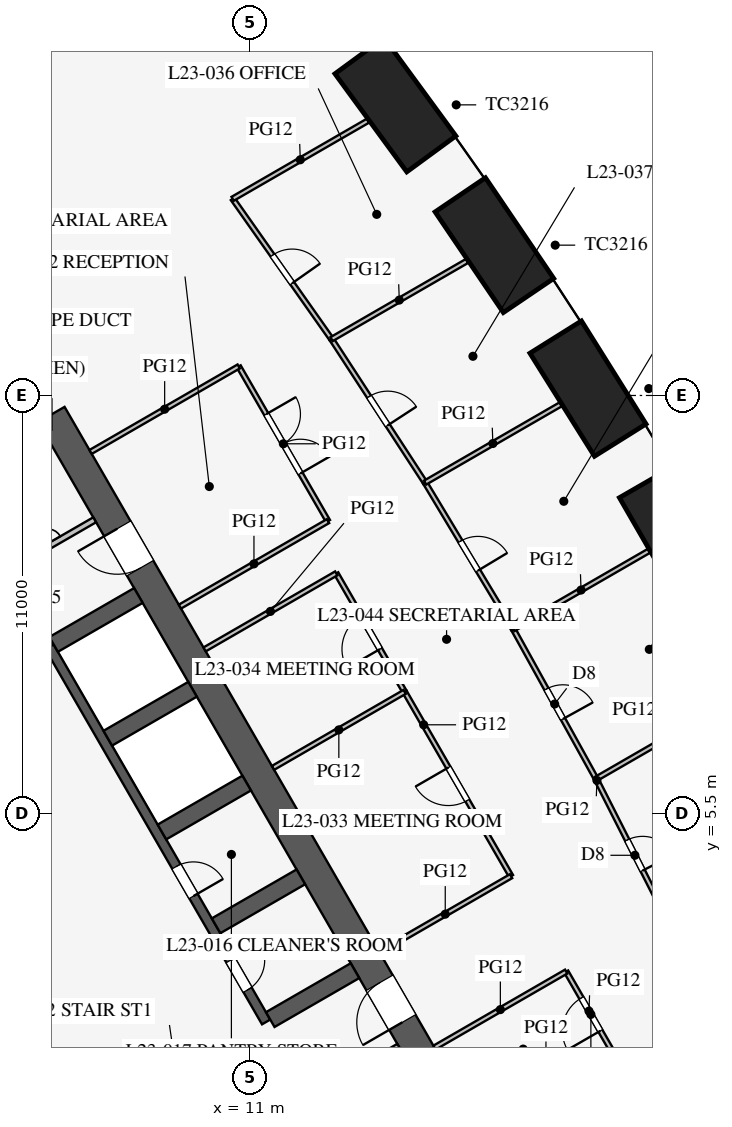
"""IFC4 building model, lengths in metres.
Left out: names, types, materials, properties, quantities, classifications, styles, units other than length and angle.
Written with IfcOpenShell. Run it as: python <this file> out.ifc"""

import sys

from ifc_helpers import new_model, si_unit, direction, frame, frame_2d, origin, origin_2d, place, context, subcontext, project, spatial, rectangle, extrude, element, fill, save


model = new_model("IFC4")
c1 = context("Model", 3, precision=1e-05, world=origin(), true_north=direction((0.0, 1.0)))
c2 = subcontext(c1, "Body", "Model", "MODEL_VIEW")
j1 = project(units=[si_unit("LENGTHUNIT", "METRE"), si_unit("PLANEANGLEUNIT", "RADIAN")], contexts=[c1])
p1 = place(None, origin())
s1 = spatial("IfcSite", under=j1, at=p1, CompositionType="ELEMENT")
p2 = place(p1, origin())
s2 = spatial("IfcBuilding", under=s1, at=p2, CompositionType="ELEMENT")
p3 = place(p2, frame((0.0, 0.0, 103.1)))
s3 = spatial("IfcBuildingStorey", under=s2, at=p3, CompositionType="ELEMENT", Elevation=103.1)
for number, where, z_axis, x_axis in (
    (1, (22.213, 12.825, 0.0), (0.0, 0.0, 1.0), (-0.5, 0.866, 0.0)),
    (2, (19.893, 16.681, 0.0), (0.0, 0.0, 1.0), (-0.531, 0.847, 0.0)),
    (3, (17.43, 20.456, 0.0), (0.0, 0.0, 1.0), (-0.561, 0.828, 0.0)),
    (4, (14.825, 24.148, 0.0), (0.0, 0.0, 1.0), (-0.591, 0.807, 0.0)),
):
    element("IfcColumn", number, at=place(p3, frame(where, z_axis=z_axis, x_axis=x_axis)), inside=s3, PredefinedType="COLUMN", context=c2, shape_type="SweptSolid", body=[
        extrude(rectangle(XDim=3.2, YDim=1.6, at=origin_2d()), origin(), (0.0, 0.0, 1.0), 4.2),
    ])
p4 = place(p3, frame((16.743, -3.0, 0.0), z_axis=(0.0, 0.0, 1.0), x_axis=(-0.500002442456, 0.866023993627, 0.0)))
e5 = element("IfcWall", 5, at=p4, inside=s3, PredefinedType="SHEAR", context=c2, shape_type="SweptSolid", body=[
    extrude(rectangle(XDim=21.939, YDim=0.8, at=frame_2d((10.97, 0.0))), origin(), (0.0, 0.0, 1.0), 4.2),
])
p5 = place(p4, frame((17.27, 0.0, 0.0)))
e6 = element("IfcOpeningElement", 6, at=p5, cuts=e5, PredefinedType="OPENING", context=c2, shape_type="SweptSolid", body=[
    extrude(rectangle(XDim=1.2, YDim=2.1, at=frame_2d((0.6, 1.05))), frame((0.0, 0.41, 0.0), z_axis=(0.0, -1.0, 0.0), x_axis=(1.0, 0.0, 0.0)), (0.0, 0.0, 1.0), 0.82),
])
p6 = place(p4, frame((3.47, 0.0, 0.0)))
e7 = element("IfcOpeningElement", 7, at=p6, cuts=e5, PredefinedType="OPENING", context=c2, shape_type="SweptSolid", body=[
    extrude(rectangle(XDim=1.2, YDim=2.1, at=frame_2d((0.6, 1.05))), frame((0.0, 0.41, 0.0), z_axis=(0.0, -1.0, 0.0), x_axis=(1.0, 0.0, 0.0)), (0.0, 0.0, 1.0), 0.82),
])
p7 = place(p3, frame((11.424, 0.014, 0.0), z_axis=(0.0, 0.0, 1.0), x_axis=(-0.500001763848, 0.866024385424, 0.0)))
e8 = element("IfcWall", 8, at=p7, inside=s3, PredefinedType="SHEAR", context=c2, shape_type="SweptSolid", body=[
    extrude(rectangle(XDim=11.4, YDim=0.25, at=frame_2d((5.7, 0.0))), origin(), (0.0, 0.0, 1.0), 4.2),
])
p8 = place(p7, frame((0.975, 0.0, 0.0)))
e9 = element("IfcOpeningElement", 9, at=p8, cuts=e8, PredefinedType="OPENING", context=c2, shape_type="SweptSolid", body=[
    extrude(rectangle(XDim=0.9, YDim=2.1, at=frame_2d((0.45, 1.05))), frame((0.0, 0.135, 0.0), z_axis=(0.0, -1.0, 0.0), x_axis=(1.0, 0.0, 0.0)), (0.0, 0.0, 1.0), 0.27),
])
p9 = place(p7, frame((3.825, 0.0, 0.0)))
e10 = element("IfcOpeningElement", 10, at=p9, cuts=e8, PredefinedType="OPENING", context=c2, shape_type="SweptSolid", body=[
    extrude(rectangle(XDim=0.9, YDim=2.1, at=frame_2d((0.45, 1.05))), frame((0.0, 0.135, 0.0), z_axis=(0.0, -1.0, 0.0), x_axis=(1.0, 0.0, 0.0)), (0.0, 0.0, 1.0), 0.27),
])
for number, where, z_axis, x_axis in (
    (11, (11.532, 0.076, 0.0), (0.0, 0.0, 1.0), (0.866, 0.5, 0.0)),
    (12, (10.107, 2.544, 0.0), (0.0, 0.0, 1.0), (0.866, 0.5, 0.0)),
    (13, (8.682, 5.012, 0.0), (0.0, 0.0, 1.0), (0.866, 0.5, 0.0)),
    (14, (7.257, 7.481, 0.0), (0.0, 0.0, 1.0), (0.866, 0.5, 0.0)),
):
    element("IfcWall", number, at=place(p3, frame(where, z_axis=z_axis, x_axis=x_axis)), inside=s3, PredefinedType="SHEAR", context=c2, shape_type="SweptSolid", body=[
        extrude(rectangle(XDim=2.575, YDim=0.45, at=frame_2d((1.288, 0.0))), origin(), (0.0, 0.0, 1.0), 4.2),
    ])
p10 = place(p3, frame((5.832, 9.949, 0.0), z_axis=(0.0, 0.0, 1.0), x_axis=(0.866029291668, 0.499993265928, 0.0)))
e15 = element("IfcWall", 15, at=p10, inside=s3, PredefinedType="SHEAR", context=c2, shape_type="SweptSolid", body=[
    extrude(rectangle(XDim=2.575, YDim=0.45, at=frame_2d((1.288, 0.0))), origin(), (0.0, 0.0, 1.0), 4.2),
])
p11 = place(p3, frame((2.495, 10.678, 0.0), z_axis=(0.0, 0.0, 1.0), x_axis=(0.86602216432, 0.500005610874, 0.0)))
e16 = element("IfcWall", 16, at=p11, inside=s3, PredefinedType="PARTITIONING", context=c2, shape_type="SweptSolid", body=[
    extrude(rectangle(XDim=5.1, YDim=0.15, at=frame_2d((2.55, 0.0))), origin(), (0.0, 0.0, 1.0), 4.0),
])
p12 = place(p11, frame((1.3, 0.0, 0.0)))
e17 = element("IfcOpeningElement", 17, at=p12, cuts=e16, PredefinedType="OPENING", context=c2, shape_type="SweptSolid", body=[
    extrude(rectangle(XDim=0.9, YDim=2.1, at=frame_2d((0.45, 1.05))), frame((0.0, 0.085, 0.0), z_axis=(0.0, -1.0, 0.0), x_axis=(1.0, 0.0, 0.0)), (0.0, 0.0, 1.0), 0.17),
])
p13 = place(p3, frame((10.495, -3.178, 0.0), z_axis=(0.0, 0.0, 1.0), x_axis=(0.86602216432, 0.500005610874, 0.0)))
e18 = element("IfcWall", 18, at=p13, inside=s3, PredefinedType="PARTITIONING", context=c2, shape_type="SweptSolid", body=[
    extrude(rectangle(XDim=5.1, YDim=0.15, at=frame_2d((2.55, 0.0))), origin(), (0.0, 0.0, 1.0), 4.0),
])
p14 = place(p13, frame((2.6, 0.0, 0.0)))
e19 = element("IfcOpeningElement", 19, at=p14, cuts=e18, PredefinedType="OPENING", context=c2, shape_type="SweptSolid", body=[
    extrude(rectangle(XDim=0.9, YDim=2.1, at=frame_2d((0.45, 1.05))), frame((0.0, 0.085, 0.0), z_axis=(0.0, -1.0, 0.0), x_axis=(1.0, 0.0, 0.0)), (0.0, 0.0, 1.0), 0.17),
])
p15 = place(p3, frame((13.052, 13.194, 0.0), z_axis=(0.0, 0.0, 1.0), x_axis=(-0.499977259774, 0.866038532462, 0.0)))
e20 = element("IfcWall", 20, at=p15, inside=s3, PredefinedType="PARTITIONING", context=c2, shape_type="SweptSolid", body=[
    extrude(rectangle(XDim=4.7, YDim=0.12, at=frame_2d((2.35, 0.0))), origin(), (0.0, 0.0, 1.0), 2.9),
])
p16 = place(p15, frame((1.45, 0.0, 0.15)))
e21 = element("IfcOpeningElement", 21, at=p16, cuts=e20, PredefinedType="OPENING", context=c2, shape_type="SweptSolid", body=[
    extrude(rectangle(XDim=1.8, YDim=2.1, at=frame_2d((0.9, 1.05))), frame((0.0, 0.07, 0.0), z_axis=(0.0, -1.0, 0.0), x_axis=(1.0, 0.0, 0.0)), (0.0, 0.0, 1.0), 0.14),
])
p17 = place(p3, frame((15.069, 8.7, 0.0), z_axis=(0.0, 0.0, 1.0), x_axis=(-0.500012057535, 0.866018442252, 0.0)))
e22 = element("IfcWall", 22, at=p17, inside=s3, PredefinedType="PARTITIONING", context=c2, shape_type="SweptSolid", body=[
    extrude(rectangle(XDim=3.6, YDim=0.12, at=frame_2d((1.8, 0.0))), origin(), (0.0, 0.0, 1.0), 2.9),
])
p18 = place(p17, frame((1.3, 0.0, 0.15)))
e23 = element("IfcOpeningElement", 23, at=p18, cuts=e22, PredefinedType="OPENING", context=c2, shape_type="SweptSolid", body=[
    extrude(rectangle(XDim=1.0, YDim=2.1, at=frame_2d((0.5, 1.05))), frame((0.0, 0.07, 0.0), z_axis=(0.0, -1.0, 0.0), x_axis=(1.0, 0.0, 0.0)), (0.0, 0.0, 1.0), 0.14),
])
p19 = place(p3, frame((20.519, -0.74, 0.0), z_axis=(0.0, 0.0, 1.0), x_axis=(-0.499957262057, 0.866050077142, 0.0)))
e24 = element("IfcWall", 24, at=p19, inside=s3, PredefinedType="PARTITIONING", context=c2, shape_type="SweptSolid", body=[
    extrude(rectangle(XDim=2.4, YDim=0.12, at=frame_2d((1.2, 0.0))), origin(), (0.0, 0.0, 1.0), 2.9),
])
p20 = place(p19, frame((0.6, 0.0, 0.15)))
e25 = element("IfcOpeningElement", 25, at=p20, cuts=e24, PredefinedType="OPENING", context=c2, shape_type="SweptSolid", body=[
    extrude(rectangle(XDim=1.0, YDim=2.1, at=frame_2d((0.5, 1.05))), frame((0.0, 0.07, 0.0), z_axis=(0.0, -1.0, 0.0), x_axis=(1.0, 0.0, 0.0)), (0.0, 0.0, 1.0), 0.14),
])
p21 = place(p3, frame((17.869, 3.85, 0.0), z_axis=(0.0, 0.0, 1.0), x_axis=(-0.500016814911, 0.866015695474, 0.0)))
e26 = element("IfcWall", 26, at=p21, inside=s3, PredefinedType="PARTITIONING", context=c2, shape_type="SweptSolid", body=[
    extrude(rectangle(XDim=5.6, YDim=0.12, at=frame_2d((2.8, 0.0))), origin(), (0.0, 0.0, 1.0), 2.9),
])
p22 = place(p21, frame((2.3, 0.0, 0.15)))
e27 = element("IfcOpeningElement", 27, at=p22, cuts=e26, PredefinedType="OPENING", context=c2, shape_type="SweptSolid", body=[
    extrude(rectangle(XDim=1.0, YDim=2.1, at=frame_2d((0.5, 1.05))), frame((0.0, 0.07, 0.0), z_axis=(0.0, -1.0, 0.0), x_axis=(1.0, 0.0, 0.0)), (0.0, 0.0, 1.0), 0.14),
])
p23 = place(p3, frame((9.805, 9.818, 0.0), z_axis=(0.0, 0.0, 1.0), x_axis=(0.866026010844, 0.49999894854, 0.0)))
e28 = element("IfcWall", 28, at=p23, inside=s3, PredefinedType="PARTITIONING", context=c2, shape_type="SweptSolid", body=[
    extrude(rectangle(XDim=4.0, YDim=0.12, at=frame_2d((2.0, 0.0))), origin(), (0.0, 0.0, 1.0), 2.9),
])
p24 = place(p3, frame((9.155, 10.944, 0.0), z_axis=(0.0, 0.0, 1.0), x_axis=(0.866017533419, 0.500013631625, 0.0)))
e29 = element("IfcWall", 29, at=p24, inside=s3, PredefinedType="PARTITIONING", context=c2, shape_type="SweptSolid", body=[
    extrude(rectangle(XDim=4.5, YDim=0.12, at=frame_2d((2.25, 0.0))), origin(), (0.0, 0.0, 1.0), 2.9),
])
p25 = place(p3, frame((6.805, 15.014, 0.0), z_axis=(0.0, 0.0, 1.0), x_axis=(0.866031096941, 0.499990139034, 0.0)))
e30 = element("IfcWall", 30, at=p25, inside=s3, PredefinedType="PARTITIONING", context=c2, shape_type="SweptSolid", body=[
    extrude(rectangle(XDim=4.5, YDim=0.12, at=frame_2d((2.25, 0.0))), origin(), (0.0, 0.0, 1.0), 2.9),
])
p26 = place(p3, frame((11.605, 6.7, 0.0), z_axis=(0.0, 0.0, 1.0), x_axis=(0.866026010844, 0.49999894854, 0.0)))
e31 = element("IfcWall", 31, at=p26, inside=s3, PredefinedType="PARTITIONING", context=c2, shape_type="SweptSolid", body=[
    extrude(rectangle(XDim=4.0, YDim=0.12, at=frame_2d((2.0, 0.0))), origin(), (0.0, 0.0, 1.0), 2.4),
])
for number, where, z_axis, x_axis in (
    (32, (14.405, 1.85, 0.0), (0.0, 0.0, 1.0), (0.866, 0.5, 0.0)),
    (33, (15.855, -0.661, 0.0), (0.0, 0.0, 1.0), (0.866, 0.5, 0.0)),
):
    element("IfcWall", number, at=place(p3, frame(where, z_axis=z_axis, x_axis=x_axis)), inside=s3, PredefinedType="PARTITIONING", context=c2, shape_type="SweptSolid", body=[
        extrude(rectangle(XDim=4.0, YDim=0.12, at=frame_2d((2.0, 0.0))), origin(), (0.0, 0.0, 1.0), 2.9),
    ])
p27 = place(p3, frame((17.927, 10.35, 0.0), z_axis=(0.0, 0.0, 1.0), x_axis=(-0.515548366618, 0.856860479703, 0.0)))
e34 = element("IfcWall", 34, at=p27, inside=s3, PredefinedType="PARTITIONING", context=c2, shape_type="SweptSolid", body=[
    extrude(rectangle(XDim=4.501, YDim=0.12, at=frame_2d((2.25, 0.0))), origin(), (0.0, 0.0, 1.0), 2.9),
])
p28 = place(p27, frame((1.8, 0.0, 0.15)))
e35 = element("IfcOpeningElement", 35, at=p28, cuts=e34, PredefinedType="OPENING", context=c2, shape_type="SweptSolid", body=[
    extrude(rectangle(XDim=0.9, YDim=2.1, at=frame_2d((0.45, 1.05))), frame((0.0, 0.07, 0.0), z_axis=(0.0, -1.0, 0.0), x_axis=(1.0, 0.0, 0.0)), (0.0, 0.0, 1.0), 0.14),
])
p29 = place(p3, frame((15.606, 14.206, 0.0), z_axis=(0.0, 0.0, 1.0), x_axis=(-0.546069464151, 0.837739900161, 0.0)))
e36 = element("IfcWall", 36, at=p29, inside=s3, PredefinedType="PARTITIONING", context=c2, shape_type="SweptSolid", body=[
    extrude(rectangle(XDim=4.507, YDim=0.12, at=frame_2d((2.253, 0.0))), origin(), (0.0, 0.0, 1.0), 2.9),
])
p30 = place(p29, frame((1.8, 0.0, 0.15)))
e37 = element("IfcOpeningElement", 37, at=p30, cuts=e36, PredefinedType="OPENING", context=c2, shape_type="SweptSolid", body=[
    extrude(rectangle(XDim=0.9, YDim=2.1, at=frame_2d((0.45, 1.05))), frame((0.0, 0.07, 0.0), z_axis=(0.0, -1.0, 0.0), x_axis=(1.0, 0.0, 0.0)), (0.0, 0.0, 1.0), 0.14),
])
p31 = place(p3, frame((13.145, 17.982, 0.0), z_axis=(0.0, 0.0, 1.0), x_axis=(-0.575987178736, 0.817458726745, 0.0)))
e38 = element("IfcWall", 38, at=p31, inside=s3, PredefinedType="PARTITIONING", context=c2, shape_type="SweptSolid", body=[
    extrude(rectangle(XDim=4.518, YDim=0.12, at=frame_2d((2.259, 0.0))), origin(), (0.0, 0.0, 1.0), 2.9),
])
p32 = place(p31, frame((1.8, 0.0, 0.15)))
e39 = element("IfcOpeningElement", 39, at=p32, cuts=e38, PredefinedType="OPENING", context=c2, shape_type="SweptSolid", body=[
    extrude(rectangle(XDim=0.9, YDim=2.1, at=frame_2d((0.45, 1.05))), frame((0.0, 0.07, 0.0), z_axis=(0.0, -1.0, 0.0), x_axis=(1.0, 0.0, 0.0)), (0.0, 0.0, 1.0), 0.14),
])
p33 = place(p3, frame((20.106, 6.412, 0.0), z_axis=(0.0, 0.0, 1.0), x_axis=(-0.484292898211, 0.874905931368, 0.0)))
e40 = element("IfcWall", 40, at=p33, inside=s3, PredefinedType="PARTITIONING", context=c2, shape_type="SweptSolid", body=[
    extrude(rectangle(XDim=4.501, YDim=0.12, at=frame_2d((2.25, 0.0))), origin(), (0.0, 0.0, 1.0), 2.9),
])
p34 = place(p33, frame((1.8, 0.0, 0.15)))
e41 = element("IfcOpeningElement", 41, at=p34, cuts=e40, PredefinedType="OPENING", context=c2, shape_type="SweptSolid", body=[
    extrude(rectangle(XDim=0.9, YDim=2.1, at=frame_2d((0.45, 1.05))), frame((0.0, 0.07, 0.0), z_axis=(0.0, -1.0, 0.0), x_axis=(1.0, 0.0, 0.0)), (0.0, 0.0, 1.0), 0.14),
])
p35 = place(p3, frame((22.145, 2.393, 0.0), z_axis=(0.0, 0.0, 1.0), x_axis=(-0.452471679136, 0.891778772779, 0.0)))
e42 = element("IfcWall", 42, at=p35, inside=s3, PredefinedType="PARTITIONING", context=c2, shape_type="SweptSolid", body=[
    extrude(rectangle(XDim=4.507, YDim=0.12, at=frame_2d((2.253, 0.0))), origin(), (0.0, 0.0, 1.0), 2.9),
])
p36 = place(p35, frame((1.8, 0.0, 0.15)))
e43 = element("IfcOpeningElement", 43, at=p36, cuts=e42, PredefinedType="OPENING", context=c2, shape_type="SweptSolid", body=[
    extrude(rectangle(XDim=0.9, YDim=2.1, at=frame_2d((0.45, 1.05))), frame((0.0, 0.07, 0.0), z_axis=(0.0, -1.0, 0.0), x_axis=(1.0, 0.0, 0.0)), (0.0, 0.0, 1.0), 0.14),
])
p37 = place(p3, frame((17.927, 10.35, 0.0), z_axis=(0.0, 0.0, 1.0), x_axis=(0.866009926209, 0.50002680699, 0.0)))
e44 = element("IfcWall", 44, at=p37, inside=s3, PredefinedType="PARTITIONING", context=c2, shape_type="SweptSolid", body=[
    extrude(rectangle(XDim=4.12, YDim=0.12, at=frame_2d((2.06, 0.0))), origin(), (0.0, 0.0, 1.0), 2.4),
])
p38 = place(p3, frame((10.543, 21.675, 0.0), z_axis=(0.0, 0.0, 1.0), x_axis=(0.866019409031, 0.500010383074, 0.0)))
e45 = element("IfcWall", 45, at=p38, inside=s3, PredefinedType="PARTITIONING", context=c2, shape_type="SweptSolid", body=[
    extrude(rectangle(XDim=4.11, YDim=0.12, at=frame_2d((2.055, 0.0))), origin(), (0.0, 0.0, 1.0), 2.2),
])
p39 = place(p3, frame((15.606, 14.206, 0.0), z_axis=(0.0, 0.0, 1.0), x_axis=(0.866016800201, 0.500014901547, 0.0)))
e46 = element("IfcWall", 46, at=p39, inside=s3, PredefinedType="PARTITIONING", context=c2, shape_type="SweptSolid", body=[
    extrude(rectangle(XDim=4.119, YDim=0.12, at=frame_2d((2.06, 0.0))), origin(), (0.0, 0.0, 1.0), 2.4),
])
p40 = place(p3, frame((13.145, 17.982, 0.0), z_axis=(0.0, 0.0, 1.0), x_axis=(0.866018637367, 0.500011719595, 0.0)))
e47 = element("IfcWall", 47, at=p40, inside=s3, PredefinedType="PARTITIONING", context=c2, shape_type="SweptSolid", body=[
    extrude(rectangle(XDim=4.116, YDim=0.12, at=frame_2d((2.058, 0.0))), origin(), (0.0, 0.0, 1.0), 2.6),
])
p41 = place(p3, frame((20.106, 6.412, 0.0), z_axis=(0.0, 0.0, 1.0), x_axis=(0.866016800201, 0.500014901547, 0.0)))
e48 = element("IfcWall", 48, at=p41, inside=s3, PredefinedType="PARTITIONING", context=c2, shape_type="SweptSolid", body=[
    extrude(rectangle(XDim=4.119, YDim=0.12, at=frame_2d((2.06, 0.0))), origin(), (0.0, 0.0, 1.0), 2.4),
])
p42 = place(p5, origin())
e49 = element("IfcDoor", 49, at=p42, inside=s3, OperationType="SINGLE_SWING_RIGHT", PredefinedType="DOOR", context=c2, shape_type="SweptSolid", body=[
    extrude(rectangle(XDim=1.2, YDim=2.1, at=frame_2d((0.6, 1.05))), frame((0.0, 0.025, 0.0), z_axis=(0.0, -1.0, 0.0), x_axis=(1.0, 0.0, 0.0)), (0.0, 0.0, 1.0), 0.05),
])
fill(e6, e49)
p43 = place(p6, origin())
e50 = element("IfcDoor", 50, at=p43, inside=s3, OperationType="SINGLE_SWING_LEFT", PredefinedType="DOOR", context=c2, shape_type="SweptSolid", body=[
    extrude(rectangle(XDim=1.2, YDim=2.1, at=frame_2d((0.6, 1.05))), frame((0.0, 0.025, 0.0), z_axis=(0.0, -1.0, 0.0), x_axis=(1.0, 0.0, 0.0)), (0.0, 0.0, 1.0), 0.05),
])
fill(e7, e50)
p44 = place(p8, frame((0.9, 0.0, 0.0), z_axis=(0.0, 0.0, 1.0), x_axis=(-1.0, 0.0, 0.0)))
e51 = element("IfcDoor", 51, at=p44, inside=s3, OperationType="SINGLE_SWING_LEFT", PredefinedType="DOOR", context=c2, shape_type="SweptSolid", body=[
    extrude(rectangle(XDim=0.9, YDim=2.1, at=frame_2d((0.45, 1.05))), frame((0.0, 0.025, 0.0), z_axis=(0.0, -1.0, 0.0), x_axis=(1.0, 0.0, 0.0)), (0.0, 0.0, 1.0), 0.05),
])
fill(e9, e51)
p45 = place(p9, frame((0.9, 0.0, 0.0), z_axis=(0.0, 0.0, 1.0), x_axis=(-1.0, 0.0, 0.0)))
e52 = element("IfcDoor", 52, at=p45, inside=s3, OperationType="SINGLE_SWING_RIGHT", PredefinedType="DOOR", context=c2, shape_type="SweptSolid", body=[
    extrude(rectangle(XDim=0.9, YDim=2.1, at=frame_2d((0.45, 1.05))), frame((0.0, 0.025, 0.0), z_axis=(0.0, -1.0, 0.0), x_axis=(1.0, 0.0, 0.0)), (0.0, 0.0, 1.0), 0.05),
])
fill(e10, e52)
p46 = place(p16, frame((1.8, 0.0, 0.0), z_axis=(0.0, 0.0, 1.0), x_axis=(-1.0, 0.0, 0.0)))
e53 = element("IfcDoor", 53, at=p46, inside=s3, OperationType="DOUBLE_DOOR_SINGLE_SWING", PredefinedType="DOOR", context=c2, shape_type="SweptSolid", body=[
    extrude(rectangle(XDim=1.8, YDim=2.1, at=frame_2d((0.9, 1.05))), frame((0.0, 0.025, 0.0), z_axis=(0.0, -1.0, 0.0), x_axis=(1.0, 0.0, 0.0)), (0.0, 0.0, 1.0), 0.05),
])
fill(e21, e53)
p47 = place(p22, origin())
e54 = element("IfcDoor", 54, at=p47, inside=s3, OperationType="SINGLE_SWING_RIGHT", PredefinedType="DOOR", context=c2, shape_type="SweptSolid", body=[
    extrude(rectangle(XDim=1.0, YDim=2.1, at=frame_2d((0.5, 1.05))), frame((0.0, 0.025, 0.0), z_axis=(0.0, -1.0, 0.0), x_axis=(1.0, 0.0, 0.0)), (0.0, 0.0, 1.0), 0.05),
])
fill(e27, e54)
p48 = place(p18, origin())
e55 = element("IfcDoor", 55, at=p48, inside=s3, OperationType="SINGLE_SWING_LEFT", PredefinedType="DOOR", context=c2, shape_type="SweptSolid", body=[
    extrude(rectangle(XDim=1.0, YDim=2.1, at=frame_2d((0.5, 1.05))), frame((0.0, 0.025, 0.0), z_axis=(0.0, -1.0, 0.0), x_axis=(1.0, 0.0, 0.0)), (0.0, 0.0, 1.0), 0.05),
])
fill(e23, e55)
p49 = place(p20, origin())
e56 = element("IfcDoor", 56, at=p49, inside=s3, OperationType="SINGLE_SWING_LEFT", PredefinedType="DOOR", context=c2, shape_type="SweptSolid", body=[
    extrude(rectangle(XDim=1.0, YDim=2.1, at=frame_2d((0.5, 1.05))), frame((0.0, 0.025, 0.0), z_axis=(0.0, -1.0, 0.0), x_axis=(1.0, 0.0, 0.0)), (0.0, 0.0, 1.0), 0.05),
])
fill(e25, e56)
p50 = place(p32, frame((0.9, 0.0, 0.0), z_axis=(0.0, 0.0, 1.0), x_axis=(-1.0, 0.0, 0.0)))
e57 = element("IfcDoor", 57, at=p50, inside=s3, OperationType="SINGLE_SWING_RIGHT", PredefinedType="DOOR", context=c2, shape_type="SweptSolid", body=[
    extrude(rectangle(XDim=0.9, YDim=2.1, at=frame_2d((0.45, 1.05))), frame((0.0, 0.025, 0.0), z_axis=(0.0, -1.0, 0.0), x_axis=(1.0, 0.0, 0.0)), (0.0, 0.0, 1.0), 0.05),
])
fill(e39, e57)
p51 = place(p30, frame((0.9, 0.0, 0.0), z_axis=(0.0, 0.0, 1.0), x_axis=(-1.0, 0.0, 0.0)))
e58 = element("IfcDoor", 58, at=p51, inside=s3, OperationType="SINGLE_SWING_RIGHT", PredefinedType="DOOR", context=c2, shape_type="SweptSolid", body=[
    extrude(rectangle(XDim=0.9, YDim=2.1, at=frame_2d((0.45, 1.05))), frame((0.0, 0.025, 0.0), z_axis=(0.0, -1.0, 0.0), x_axis=(1.0, 0.0, 0.0)), (0.0, 0.0, 1.0), 0.05),
])
fill(e37, e58)
p52 = place(p28, frame((0.9, 0.0, 0.0), z_axis=(0.0, 0.0, 1.0), x_axis=(-1.0, 0.0, 0.0)))
e59 = element("IfcDoor", 59, at=p52, inside=s3, OperationType="SINGLE_SWING_RIGHT", PredefinedType="DOOR", context=c2, shape_type="SweptSolid", body=[
    extrude(rectangle(XDim=0.9, YDim=2.1, at=frame_2d((0.45, 1.05))), frame((0.0, 0.025, 0.0), z_axis=(0.0, -1.0, 0.0), x_axis=(1.0, 0.0, 0.0)), (0.0, 0.0, 1.0), 0.05),
])
fill(e35, e59)
p53 = place(p34, frame((0.9, 0.0, 0.0), z_axis=(0.0, 0.0, 1.0), x_axis=(-1.0, 0.0, 0.0)))
e60 = element("IfcDoor", 60, at=p53, inside=s3, OperationType="SINGLE_SWING_RIGHT", PredefinedType="DOOR", context=c2, shape_type="SweptSolid", body=[
    extrude(rectangle(XDim=0.9, YDim=2.1, at=frame_2d((0.45, 1.05))), frame((0.0, 0.025, 0.0), z_axis=(0.0, -1.0, 0.0), x_axis=(1.0, 0.0, 0.0)), (0.0, 0.0, 1.0), 0.05),
])
fill(e41, e60)
p54 = place(p36, frame((0.9, 0.0, 0.0), z_axis=(0.0, 0.0, 1.0), x_axis=(-1.0, 0.0, 0.0)))
e61 = element("IfcDoor", 61, at=p54, inside=s3, OperationType="SINGLE_SWING_RIGHT", PredefinedType="DOOR", context=c2, shape_type="SweptSolid", body=[
    extrude(rectangle(XDim=0.9, YDim=2.1, at=frame_2d((0.45, 1.05))), frame((0.0, 0.025, 0.0), z_axis=(0.0, -1.0, 0.0), x_axis=(1.0, 0.0, 0.0)), (0.0, 0.0, 1.0), 0.05),
])
fill(e43, e61)
save(model, sys.argv[1])
